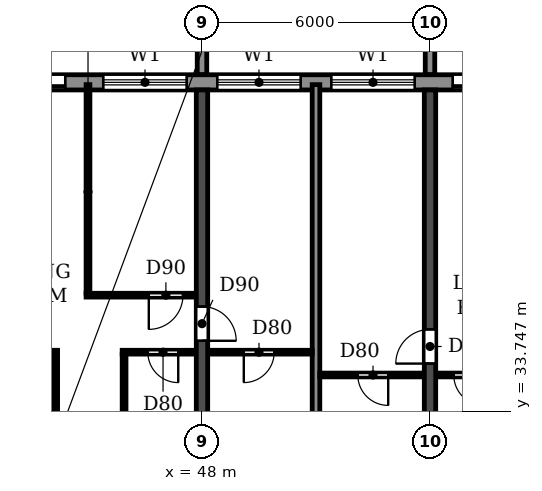
"""IFC4 building model, lengths in metres.
Left out: names, types, materials, properties, quantities, classifications, styles, units other than length and angle.
Written with IfcOpenShell. Run it as: python <this file> out.ifc"""

import sys

from ifc_helpers import new_model, si_unit, direction, frame, frame_2d, origin, place, context, subcontext, project, spatial, polyline, rectangle, outline, extrude, source, transform, mapped, element, fill, save


model = new_model("IFC4")
c1 = context("Model", 3, precision=1e-05, world=origin(), true_north=direction((0.0, 1.0)))
c2 = subcontext(c1, "Body", "Model", "MODEL_VIEW")
j1 = project(units=[si_unit("LENGTHUNIT", "METRE"), si_unit("PLANEANGLEUNIT", "RADIAN")], contexts=[c1])
p1 = place(None, origin())
s1 = spatial("IfcSite", under=j1, at=p1, CompositionType="ELEMENT")
p2 = place(p1, origin())
s2 = spatial("IfcBuilding", under=s1, at=p2, CompositionType="ELEMENT")
p3 = place(p2, frame((0.0, 0.0, 132.3)))
s3 = spatial("IfcBuildingStorey", under=s2, at=p3, CompositionType="ELEMENT", Elevation=132.3)
p4 = place(p3, frame((48.0, 30.525, 0.0), z_axis=(0.0, 0.0, 1.0), x_axis=(0.0, 1.0, 0.0)))
e1 = element("IfcWall", 1, at=p4, inside=s3, PredefinedType="SHEAR", context=c2, shape_type="SweptSolid", body=[
    extrude(rectangle(XDim=11.675, YDim=0.3, at=frame_2d((5.837, 0.0))), origin(), (0.0, 0.0, 1.0), 3.07),
])
p5 = place(p4, frame((5.075, 0.0, 0.0)))
e2 = element("IfcOpeningElement", 2, at=p5, cuts=e1, PredefinedType="OPENING", context=c2, shape_type="SweptSolid", body=[
    extrude(rectangle(XDim=0.9, YDim=2.1, at=frame_2d((0.45, 1.05))), frame((0.0, 0.16, 0.0), z_axis=(0.0, -1.0, 0.0), x_axis=(1.0, 0.0, 0.0)), (0.0, 0.0, 1.0), 0.32),
])
p6 = place(p3, frame((54.0, 30.525, 0.0), z_axis=(0.0, 0.0, 1.0), x_axis=(0.0, 1.0, 0.0)))
e3 = element("IfcWall", 3, at=p6, inside=s3, PredefinedType="SHEAR", context=c2, shape_type="SweptSolid", body=[
    extrude(rectangle(XDim=11.675, YDim=0.3, at=frame_2d((5.837, 0.0))), origin(), (0.0, 0.0, 1.0), 3.07),
])
p7 = place(p6, frame((4.475, 0.0, 0.0)))
e4 = element("IfcOpeningElement", 4, at=p7, cuts=e3, PredefinedType="OPENING", context=c2, shape_type="SweptSolid", body=[
    extrude(rectangle(XDim=0.9, YDim=2.1, at=frame_2d((0.45, 1.05))), frame((0.0, 0.16, 0.0), z_axis=(0.0, -1.0, 0.0), x_axis=(1.0, 0.0, 0.0)), (0.0, 0.0, 1.0), 0.32),
])
p8 = place(p3, frame((85.317, 42.4, 0.0), z_axis=(0.0, 0.0, 1.0), x_axis=(-1.0, 0.0, 0.0)))
e5 = element("IfcWall", 5, at=p8, inside=s3, PredefinedType="STANDARD", context=c2, shape_type="SweptSolid", body=[
    extrude(rectangle(XDim=68.634, YDim=0.4, at=frame_2d((34.317, 0.0))), origin(), (0.0, 0.0, 1.0), 3.07),
])
p9 = place(p8, frame((64.917, 0.0, 0.0)))
e6 = element("IfcOpeningElement", 6, at=p9, cuts=e5, PredefinedType="OPENING", context=c2, shape_type="SweptSolid", body=[
    extrude(rectangle(XDim=1.8, YDim=2.4, at=frame_2d((0.9, 1.2))), frame((0.0, 0.21, 0.0), z_axis=(0.0, -1.0, 0.0), x_axis=(1.0, 0.0, 0.0)), (0.0, 0.0, 1.0), 0.42),
])
p10 = place(p8, frame((61.717, 0.0, 0.9)))
e7 = element("IfcOpeningElement", 7, at=p10, cuts=e5, PredefinedType="OPENING", context=c2, shape_type="SweptSolid", body=[
    extrude(rectangle(XDim=2.2, YDim=1.5, at=frame_2d((1.1, 0.75))), frame((0.0, 0.21, 0.0), z_axis=(0.0, -1.0, 0.0), x_axis=(1.0, 0.0, 0.0)), (0.0, 0.0, 1.0), 0.42),
])
p11 = place(p8, frame((58.717, 0.0, 0.9)))
e8 = element("IfcOpeningElement", 8, at=p11, cuts=e5, PredefinedType="OPENING", context=c2, shape_type="SweptSolid", body=[
    extrude(rectangle(XDim=2.2, YDim=1.5, at=frame_2d((1.1, 0.75))), frame((0.0, 0.21, 0.0), z_axis=(0.0, -1.0, 0.0), x_axis=(1.0, 0.0, 0.0)), (0.0, 0.0, 1.0), 0.42),
])
p12 = place(p8, frame((55.717, 0.0, 0.9)))
e9 = element("IfcOpeningElement", 9, at=p12, cuts=e5, PredefinedType="OPENING", context=c2, shape_type="SweptSolid", body=[
    extrude(rectangle(XDim=2.2, YDim=1.5, at=frame_2d((1.1, 0.75))), frame((0.0, 0.21, 0.0), z_axis=(0.0, -1.0, 0.0), x_axis=(1.0, 0.0, 0.0)), (0.0, 0.0, 1.0), 0.42),
])
p13 = place(p8, frame((52.917, 0.0, 0.0)))
e10 = element("IfcOpeningElement", 10, at=p13, cuts=e5, PredefinedType="OPENING", context=c2, shape_type="SweptSolid", body=[
    extrude(rectangle(XDim=1.8, YDim=2.4, at=frame_2d((0.9, 1.2))), frame((0.0, 0.21, 0.0), z_axis=(0.0, -1.0, 0.0), x_axis=(1.0, 0.0, 0.0)), (0.0, 0.0, 1.0), 0.42),
])
p14 = place(p8, frame((49.717, 0.0, 0.9)))
e11 = element("IfcOpeningElement", 11, at=p14, cuts=e5, PredefinedType="OPENING", context=c2, shape_type="SweptSolid", body=[
    extrude(rectangle(XDim=2.2, YDim=1.5, at=frame_2d((1.1, 0.75))), frame((0.0, 0.21, 0.0), z_axis=(0.0, -1.0, 0.0), x_axis=(1.0, 0.0, 0.0)), (0.0, 0.0, 1.0), 0.42),
])
p15 = place(p8, frame((46.717, 0.0, 0.9)))
e12 = element("IfcOpeningElement", 12, at=p15, cuts=e5, PredefinedType="OPENING", context=c2, shape_type="SweptSolid", body=[
    extrude(rectangle(XDim=2.2, YDim=1.5, at=frame_2d((1.1, 0.75))), frame((0.0, 0.21, 0.0), z_axis=(0.0, -1.0, 0.0), x_axis=(1.0, 0.0, 0.0)), (0.0, 0.0, 1.0), 0.42),
])
p16 = place(p8, frame((43.917, 0.0, 0.0)))
e13 = element("IfcOpeningElement", 13, at=p16, cuts=e5, PredefinedType="OPENING", context=c2, shape_type="SweptSolid", body=[
    extrude(rectangle(XDim=1.8, YDim=2.4, at=frame_2d((0.9, 1.2))), frame((0.0, 0.21, 0.0), z_axis=(0.0, -1.0, 0.0), x_axis=(1.0, 0.0, 0.0)), (0.0, 0.0, 1.0), 0.42),
])
p17 = place(p8, frame((40.917, 0.0, 0.0)))
e14 = element("IfcOpeningElement", 14, at=p17, cuts=e5, PredefinedType="OPENING", context=c2, shape_type="SweptSolid", body=[
    extrude(rectangle(XDim=1.8, YDim=2.4, at=frame_2d((0.9, 1.2))), frame((0.0, 0.21, 0.0), z_axis=(0.0, -1.0, 0.0), x_axis=(1.0, 0.0, 0.0)), (0.0, 0.0, 1.0), 0.42),
])
p18 = place(p8, frame((37.717, 0.0, 0.9)))
e15 = element("IfcOpeningElement", 15, at=p18, cuts=e5, PredefinedType="OPENING", context=c2, shape_type="SweptSolid", body=[
    extrude(rectangle(XDim=2.2, YDim=1.5, at=frame_2d((1.1, 0.75))), frame((0.0, 0.21, 0.0), z_axis=(0.0, -1.0, 0.0), x_axis=(1.0, 0.0, 0.0)), (0.0, 0.0, 1.0), 0.42),
])
p19 = place(p8, frame((34.717, 0.0, 0.9)))
e16 = element("IfcOpeningElement", 16, at=p19, cuts=e5, PredefinedType="OPENING", context=c2, shape_type="SweptSolid", body=[
    extrude(rectangle(XDim=2.2, YDim=1.5, at=frame_2d((1.1, 0.75))), frame((0.0, 0.21, 0.0), z_axis=(0.0, -1.0, 0.0), x_axis=(1.0, 0.0, 0.0)), (0.0, 0.0, 1.0), 0.42),
])
p20 = place(p8, frame((31.717, 0.0, 0.9)))
e17 = element("IfcOpeningElement", 17, at=p20, cuts=e5, PredefinedType="OPENING", context=c2, shape_type="SweptSolid", body=[
    extrude(rectangle(XDim=2.2, YDim=1.5, at=frame_2d((1.1, 0.75))), frame((0.0, 0.21, 0.0), z_axis=(0.0, -1.0, 0.0), x_axis=(1.0, 0.0, 0.0)), (0.0, 0.0, 1.0), 0.42),
])
p21 = place(p8, frame((28.917, 0.0, 0.0)))
e18 = element("IfcOpeningElement", 18, at=p21, cuts=e5, PredefinedType="OPENING", context=c2, shape_type="SweptSolid", body=[
    extrude(rectangle(XDim=1.8, YDim=2.4, at=frame_2d((0.9, 1.2))), frame((0.0, 0.21, 0.0), z_axis=(0.0, -1.0, 0.0), x_axis=(1.0, 0.0, 0.0)), (0.0, 0.0, 1.0), 0.42),
])
p22 = place(p8, frame((25.717, 0.0, 0.9)))
e19 = element("IfcOpeningElement", 19, at=p22, cuts=e5, PredefinedType="OPENING", context=c2, shape_type="SweptSolid", body=[
    extrude(rectangle(XDim=2.2, YDim=1.5, at=frame_2d((1.1, 0.75))), frame((0.0, 0.21, 0.0), z_axis=(0.0, -1.0, 0.0), x_axis=(1.0, 0.0, 0.0)), (0.0, 0.0, 1.0), 0.42),
])
p23 = place(p8, frame((22.717, 0.0, 0.9)))
e20 = element("IfcOpeningElement", 20, at=p23, cuts=e5, PredefinedType="OPENING", context=c2, shape_type="SweptSolid", body=[
    extrude(rectangle(XDim=2.2, YDim=1.5, at=frame_2d((1.1, 0.75))), frame((0.0, 0.21, 0.0), z_axis=(0.0, -1.0, 0.0), x_axis=(1.0, 0.0, 0.0)), (0.0, 0.0, 1.0), 0.42),
])
p24 = place(p8, frame((19.717, 0.0, 0.9)))
e21 = element("IfcOpeningElement", 21, at=p24, cuts=e5, PredefinedType="OPENING", context=c2, shape_type="SweptSolid", body=[
    extrude(rectangle(XDim=2.2, YDim=1.5, at=frame_2d((1.1, 0.75))), frame((0.0, 0.21, 0.0), z_axis=(0.0, -1.0, 0.0), x_axis=(1.0, 0.0, 0.0)), (0.0, 0.0, 1.0), 0.42),
])
p25 = place(p8, frame((16.717, 0.0, 0.9)))
e22 = element("IfcOpeningElement", 22, at=p25, cuts=e5, PredefinedType="OPENING", context=c2, shape_type="SweptSolid", body=[
    extrude(rectangle(XDim=2.2, YDim=1.5, at=frame_2d((1.1, 0.75))), frame((0.0, 0.21, 0.0), z_axis=(0.0, -1.0, 0.0), x_axis=(1.0, 0.0, 0.0)), (0.0, 0.0, 1.0), 0.42),
])
p26 = place(p8, frame((13.917, 0.0, 0.0)))
e23 = element("IfcOpeningElement", 23, at=p26, cuts=e5, PredefinedType="OPENING", context=c2, shape_type="SweptSolid", body=[
    extrude(rectangle(XDim=1.8, YDim=2.4, at=frame_2d((0.9, 1.2))), frame((0.0, 0.21, 0.0), z_axis=(0.0, -1.0, 0.0), x_axis=(1.0, 0.0, 0.0)), (0.0, 0.0, 1.0), 0.42),
])
p27 = place(p8, frame((10.717, 0.0, 0.9)))
e24 = element("IfcOpeningElement", 24, at=p27, cuts=e5, PredefinedType="OPENING", context=c2, shape_type="SweptSolid", body=[
    extrude(rectangle(XDim=2.2, YDim=1.5, at=frame_2d((1.1, 0.75))), frame((0.0, 0.21, 0.0), z_axis=(0.0, -1.0, 0.0), x_axis=(1.0, 0.0, 0.0)), (0.0, 0.0, 1.0), 0.42),
])
p28 = place(p8, frame((7.917, 0.0, 0.0)))
e25 = element("IfcOpeningElement", 25, at=p28, cuts=e5, PredefinedType="OPENING", context=c2, shape_type="SweptSolid", body=[
    extrude(rectangle(XDim=1.8, YDim=2.4, at=frame_2d((0.9, 1.2))), frame((0.0, 0.21, 0.0), z_axis=(0.0, -1.0, 0.0), x_axis=(1.0, 0.0, 0.0)), (0.0, 0.0, 1.0), 0.42),
])
p29 = place(p8, frame((4.717, 0.0, 0.9)))
e26 = element("IfcOpeningElement", 26, at=p29, cuts=e5, PredefinedType="OPENING", context=c2, shape_type="SweptSolid", body=[
    extrude(rectangle(XDim=2.2, YDim=1.5, at=frame_2d((1.1, 0.75))), frame((0.0, 0.21, 0.0), z_axis=(0.0, -1.0, 0.0), x_axis=(1.0, 0.0, 0.0)), (0.0, 0.0, 1.0), 0.42),
])
p30 = place(p8, frame((1.917, 0.0, 0.0)))
e27 = element("IfcOpeningElement", 27, at=p30, cuts=e5, PredefinedType="OPENING", context=c2, shape_type="SweptSolid", body=[
    extrude(rectangle(XDim=1.8, YDim=2.4, at=frame_2d((0.9, 1.2))), frame((0.0, 0.21, 0.0), z_axis=(0.0, -1.0, 0.0), x_axis=(1.0, 0.0, 0.0)), (0.0, 0.0, 1.0), 0.42),
])
m1 = source(origin(), c2, "Body", "SweptSolid", [
    extrude(outline(polyline([(0.0, 0.0), (0.25, 0.0), (0.25, 3.1), (0.0, 3.1), (0.0, 0.0)])), origin(), (0.0, 0.0, 1.0), 3.1),
])
for number, where in (
    (28, (47.875, 42.6, 0.0)),
    (29, (53.875, 42.6, 0.0)),
):
    element("IfcWall", number, at=place(p3, frame(where)), inside=s3, PredefinedType="STANDARD", context=c2, shape_type="MappedRepresentation", body=[
        mapped(m1, transform((0.0, 0.0, 0.0))),
    ])
p31 = place(p3, frame((51.0, 30.535, 0.0), z_axis=(0.0, 0.0, 1.0), x_axis=(0.0, 1.0, 0.0)))
e30 = element("IfcWall", 30, at=p31, inside=s3, PredefinedType="PARTITIONING", context=c2, shape_type="SweptSolid", body=[
    extrude(rectangle(XDim=11.805, YDim=0.2, at=frame_2d((5.903, 0.0))), origin(), (0.0, 0.0, 1.0), 3.07),
])
p32 = place(p3, frame((51.1, 34.7, 0.0), z_axis=(0.0, 0.0, 1.0), x_axis=(1.0, 0.0, 0.0)))
e31 = element("IfcWall", 31, at=p32, inside=s3, PredefinedType="PARTITIONING", context=c2, shape_type="SweptSolid", body=[
    extrude(rectangle(XDim=2.74, YDim=0.1, at=frame_2d((1.37, 0.0))), origin(), (0.0, 0.0, 1.0), 3.07),
])
p33 = place(p32, frame((1.0, 0.0, 0.0)))
e32 = element("IfcOpeningElement", 32, at=p33, cuts=e31, PredefinedType="OPENING", context=c2, shape_type="SweptSolid", body=[
    extrude(rectangle(XDim=0.8, YDim=2.1, at=frame_2d((0.4, 1.05))), frame((0.0, 0.06, 0.0), z_axis=(0.0, -1.0, 0.0), x_axis=(1.0, 0.0, 0.0)), (0.0, 0.0, 1.0), 0.12),
])
p34 = place(p3, frame((54.16, 34.7, 0.0), z_axis=(0.0, 0.0, 1.0), x_axis=(1.0, 0.0, 0.0)))
e33 = element("IfcWall", 33, at=p34, inside=s3, PredefinedType="PARTITIONING", context=c2, shape_type="SweptSolid", body=[
    extrude(rectangle(XDim=1.94, YDim=0.1, at=frame_2d((0.97, 0.0))), origin(), (0.0, 0.0, 1.0), 3.07),
])
p35 = place(p34, frame((0.465, 0.0, 0.0)))
e34 = element("IfcOpeningElement", 34, at=p35, cuts=e33, PredefinedType="OPENING", context=c2, shape_type="SweptSolid", body=[
    extrude(rectangle(XDim=0.8, YDim=2.1, at=frame_2d((0.4, 1.05))), frame((0.0, 0.06, 0.0), z_axis=(0.0, -1.0, 0.0), x_axis=(1.0, 0.0, 0.0)), (0.0, 0.0, 1.0), 0.12),
])
p36 = place(p3, frame((42.16, 35.3, 0.0), z_axis=(0.0, 0.0, 1.0), x_axis=(1.0, 0.0, 0.0)))
e35 = element("IfcWall", 35, at=p36, inside=s3, PredefinedType="PARTITIONING", context=c2, shape_type="SweptSolid", body=[
    extrude(rectangle(XDim=2.04, YDim=0.1, at=frame_2d((1.02, 0.0))), origin(), (0.0, 0.0, 1.0), 3.07),
])
p37 = place(p36, frame((0.465, 0.0, 0.0)))
e36 = element("IfcOpeningElement", 36, at=p37, cuts=e35, PredefinedType="OPENING", context=c2, shape_type="SweptSolid", body=[
    extrude(rectangle(XDim=0.9, YDim=2.1, at=frame_2d((0.45, 1.05))), frame((0.0, 0.06, 0.0), z_axis=(0.0, -1.0, 0.0), x_axis=(1.0, 0.0, 0.0)), (0.0, 0.0, 1.0), 0.12),
])
p38 = place(p3, frame((45.9, 35.3, 0.0), z_axis=(0.0, 0.0, 1.0), x_axis=(1.0, 0.0, 0.0)))
e37 = element("IfcWall", 37, at=p38, inside=s3, PredefinedType="PARTITIONING", context=c2, shape_type="SweptSolid", body=[
    extrude(rectangle(XDim=1.94, YDim=0.1, at=frame_2d((0.97, 0.0))), origin(), (0.0, 0.0, 1.0), 3.07),
])
p39 = place(p38, frame((0.675, 0.0, 0.0)))
e38 = element("IfcOpeningElement", 38, at=p39, cuts=e37, PredefinedType="OPENING", context=c2, shape_type="SweptSolid", body=[
    extrude(rectangle(XDim=0.8, YDim=2.1, at=frame_2d((0.4, 1.05))), frame((0.0, 0.06, 0.0), z_axis=(0.0, -1.0, 0.0), x_axis=(1.0, 0.0, 0.0)), (0.0, 0.0, 1.0), 0.12),
])
p40 = place(p3, frame((48.16, 35.3, 0.0), z_axis=(0.0, 0.0, 1.0), x_axis=(1.0, 0.0, 0.0)))
e39 = element("IfcWall", 39, at=p40, inside=s3, PredefinedType="PARTITIONING", context=c2, shape_type="SweptSolid", body=[
    extrude(rectangle(XDim=2.74, YDim=0.1, at=frame_2d((1.37, 0.0))), origin(), (0.0, 0.0, 1.0), 3.07),
])
p41 = place(p40, frame((0.94, 0.0, 0.0)))
e40 = element("IfcOpeningElement", 40, at=p41, cuts=e39, PredefinedType="OPENING", context=c2, shape_type="SweptSolid", body=[
    extrude(rectangle(XDim=0.8, YDim=2.1, at=frame_2d((0.4, 1.05))), frame((0.0, 0.06, 0.0), z_axis=(0.0, -1.0, 0.0), x_axis=(1.0, 0.0, 0.0)), (0.0, 0.0, 1.0), 0.12),
])
p42 = place(p3, frame((44.95, 36.8, 0.0), z_axis=(0.0, 0.0, 1.0), x_axis=(1.0, 0.0, 0.0)))
e41 = element("IfcWall", 41, at=p42, inside=s3, PredefinedType="PARTITIONING", context=c2, shape_type="SweptSolid", body=[
    extrude(rectangle(XDim=2.89, YDim=0.1, at=frame_2d((1.445, 0.0))), origin(), (0.0, 0.0, 1.0), 3.07),
])
p43 = place(p42, frame((1.65, 0.0, 0.0)))
e42 = element("IfcOpeningElement", 42, at=p43, cuts=e41, PredefinedType="OPENING", context=c2, shape_type="SweptSolid", body=[
    extrude(rectangle(XDim=0.9, YDim=2.1, at=frame_2d((0.45, 1.05))), frame((0.0, 0.06, 0.0), z_axis=(0.0, -1.0, 0.0), x_axis=(1.0, 0.0, 0.0)), (0.0, 0.0, 1.0), 0.12),
])
p44 = place(p3, frame((44.15, 30.535, 0.0), z_axis=(0.0, 0.0, 1.0), x_axis=(0.0, 1.0, 0.0)))
e43 = element("IfcWall", 43, at=p44, inside=s3, PredefinedType="PARTITIONING", context=c2, shape_type="SweptSolid", body=[
    extrude(rectangle(XDim=4.715, YDim=0.1, at=frame_2d((2.357, 0.0))), origin(), (0.0, 0.0, 1.0), 3.07),
])
p45 = place(p3, frame((45.0, 36.85, 0.0), z_axis=(0.0, 0.0, 1.0), x_axis=(0.0, 1.0, 0.0)))
e44 = element("IfcWall", 44, at=p45, inside=s3, PredefinedType="PARTITIONING", context=c2, shape_type="SweptSolid", body=[
    extrude(rectangle(XDim=5.49, YDim=0.1, at=frame_2d((2.745, 0.0))), origin(), (0.0, 0.0, 1.0), 3.07),
])
p46 = place(p3, frame((45.95, 30.535, 0.0), z_axis=(0.0, 0.0, 1.0), x_axis=(0.0, 1.0, 0.0)))
e45 = element("IfcWall", 45, at=p46, inside=s3, PredefinedType="PARTITIONING", context=c2, shape_type="SweptSolid", body=[
    extrude(rectangle(XDim=4.715, YDim=0.1, at=frame_2d((2.357, 0.0))), origin(), (0.0, 0.0, 1.0), 3.07),
])
p47 = place(p17, origin())
e46 = element("IfcDoor", 46, at=p47, inside=s3, OperationType="DOUBLE_DOOR_SLIDING", PredefinedType="DOOR", context=c2, shape_type="SweptSolid", body=[
    extrude(rectangle(XDim=1.8, YDim=2.4, at=frame_2d((0.9, 1.2))), frame((0.0, 0.025, 0.0), z_axis=(0.0, -1.0, 0.0), x_axis=(1.0, 0.0, 0.0)), (0.0, 0.0, 1.0), 0.05),
])
fill(e14, e46)
p48 = place(p18, origin())
e47 = element("IfcWindow", 47, at=p48, inside=s3, PartitioningType="DOUBLE_PANEL_HORIZONTAL", PredefinedType="WINDOW", context=c2, shape_type="SweptSolid", body=[
    extrude(rectangle(XDim=2.2, YDim=1.5, at=frame_2d((1.1, 0.75))), frame((0.0, 0.03, 0.0), z_axis=(0.0, -1.0, 0.0), x_axis=(1.0, 0.0, 0.0)), (0.0, 0.0, 1.0), 0.06),
])
fill(e15, e47)
p49 = place(p19, origin())
e48 = element("IfcWindow", 48, at=p49, inside=s3, PartitioningType="DOUBLE_PANEL_HORIZONTAL", PredefinedType="WINDOW", context=c2, shape_type="SweptSolid", body=[
    extrude(rectangle(XDim=2.2, YDim=1.5, at=frame_2d((1.1, 0.75))), frame((0.0, 0.03, 0.0), z_axis=(0.0, -1.0, 0.0), x_axis=(1.0, 0.0, 0.0)), (0.0, 0.0, 1.0), 0.06),
])
fill(e16, e48)
p50 = place(p20, origin())
e49 = element("IfcWindow", 49, at=p50, inside=s3, PartitioningType="DOUBLE_PANEL_HORIZONTAL", PredefinedType="WINDOW", context=c2, shape_type="SweptSolid", body=[
    extrude(rectangle(XDim=2.2, YDim=1.5, at=frame_2d((1.1, 0.75))), frame((0.0, 0.03, 0.0), z_axis=(0.0, -1.0, 0.0), x_axis=(1.0, 0.0, 0.0)), (0.0, 0.0, 1.0), 0.06),
])
fill(e17, e49)
p51 = place(p21, origin())
e50 = element("IfcDoor", 50, at=p51, inside=s3, OperationType="DOUBLE_DOOR_SLIDING", PredefinedType="DOOR", context=c2, shape_type="SweptSolid", body=[
    extrude(rectangle(XDim=1.8, YDim=2.4, at=frame_2d((0.9, 1.2))), frame((0.0, 0.025, 0.0), z_axis=(0.0, -1.0, 0.0), x_axis=(1.0, 0.0, 0.0)), (0.0, 0.0, 1.0), 0.05),
])
fill(e18, e50)
p52 = place(p41, frame((0.8, 0.0, 0.0), z_axis=(0.0, 0.0, 1.0), x_axis=(-1.0, 0.0, 0.0)))
e51 = element("IfcDoor", 51, at=p52, inside=s3, OperationType="SINGLE_SWING_RIGHT", PredefinedType="DOOR", context=c2, shape_type="SweptSolid", body=[
    extrude(rectangle(XDim=0.8, YDim=2.1, at=frame_2d((0.4, 1.05))), frame((0.0, 0.025, 0.0), z_axis=(0.0, -1.0, 0.0), x_axis=(1.0, 0.0, 0.0)), (0.0, 0.0, 1.0), 0.05),
])
fill(e40, e51)
p53 = place(p39, frame((0.8, 0.0, 0.0), z_axis=(0.0, 0.0, 1.0), x_axis=(-1.0, 0.0, 0.0)))
e52 = element("IfcDoor", 52, at=p53, inside=s3, OperationType="SINGLE_SWING_LEFT", PredefinedType="DOOR", context=c2, shape_type="SweptSolid", body=[
    extrude(rectangle(XDim=0.8, YDim=2.1, at=frame_2d((0.4, 1.05))), frame((0.0, 0.025, 0.0), z_axis=(0.0, -1.0, 0.0), x_axis=(1.0, 0.0, 0.0)), (0.0, 0.0, 1.0), 0.05),
])
fill(e38, e52)
p54 = place(p43, frame((0.9, 0.0, 0.0), z_axis=(0.0, 0.0, 1.0), x_axis=(-1.0, 0.0, 0.0)))
e53 = element("IfcDoor", 53, at=p54, inside=s3, OperationType="SINGLE_SWING_RIGHT", PredefinedType="DOOR", context=c2, shape_type="SweptSolid", body=[
    extrude(rectangle(XDim=0.9, YDim=2.1, at=frame_2d((0.45, 1.05))), frame((0.0, 0.025, 0.0), z_axis=(0.0, -1.0, 0.0), x_axis=(1.0, 0.0, 0.0)), (0.0, 0.0, 1.0), 0.05),
])
fill(e42, e53)
p55 = place(p5, frame((0.9, 0.0, 0.0), z_axis=(0.0, 0.0, 1.0), x_axis=(-1.0, 0.0, 0.0)))
e54 = element("IfcDoor", 54, at=p55, inside=s3, OperationType="SINGLE_SWING_RIGHT", PredefinedType="DOOR", context=c2, shape_type="SweptSolid", body=[
    extrude(rectangle(XDim=0.9, YDim=2.1, at=frame_2d((0.45, 1.05))), frame((0.0, 0.025, 0.0), z_axis=(0.0, -1.0, 0.0), x_axis=(1.0, 0.0, 0.0)), (0.0, 0.0, 1.0), 0.05),
])
fill(e2, e54)
p56 = place(p33, frame((0.8, 0.0, 0.0), z_axis=(0.0, 0.0, 1.0), x_axis=(-1.0, 0.0, 0.0)))
e55 = element("IfcDoor", 55, at=p56, inside=s3, OperationType="SINGLE_SWING_LEFT", PredefinedType="DOOR", context=c2, shape_type="SweptSolid", body=[
    extrude(rectangle(XDim=0.8, YDim=2.1, at=frame_2d((0.4, 1.05))), frame((0.0, 0.025, 0.0), z_axis=(0.0, -1.0, 0.0), x_axis=(1.0, 0.0, 0.0)), (0.0, 0.0, 1.0), 0.05),
])
fill(e32, e55)
p57 = place(p7, origin())
e56 = element("IfcDoor", 56, at=p57, inside=s3, OperationType="SINGLE_SWING_LEFT", PredefinedType="DOOR", context=c2, shape_type="SweptSolid", body=[
    extrude(rectangle(XDim=0.9, YDim=2.1, at=frame_2d((0.45, 1.05))), frame((0.0, 0.025, 0.0), z_axis=(0.0, -1.0, 0.0), x_axis=(1.0, 0.0, 0.0)), (0.0, 0.0, 1.0), 0.05),
])
fill(e4, e56)
p58 = place(p35, frame((0.8, 0.0, 0.0), z_axis=(0.0, 0.0, 1.0), x_axis=(-1.0, 0.0, 0.0)))
e57 = element("IfcDoor", 57, at=p58, inside=s3, OperationType="SINGLE_SWING_LEFT", PredefinedType="DOOR", context=c2, shape_type="SweptSolid", body=[
    extrude(rectangle(XDim=0.8, YDim=2.1, at=frame_2d((0.4, 1.05))), frame((0.0, 0.025, 0.0), z_axis=(0.0, -1.0, 0.0), x_axis=(1.0, 0.0, 0.0)), (0.0, 0.0, 1.0), 0.05),
])
fill(e34, e57)
save(model, sys.argv[1])
